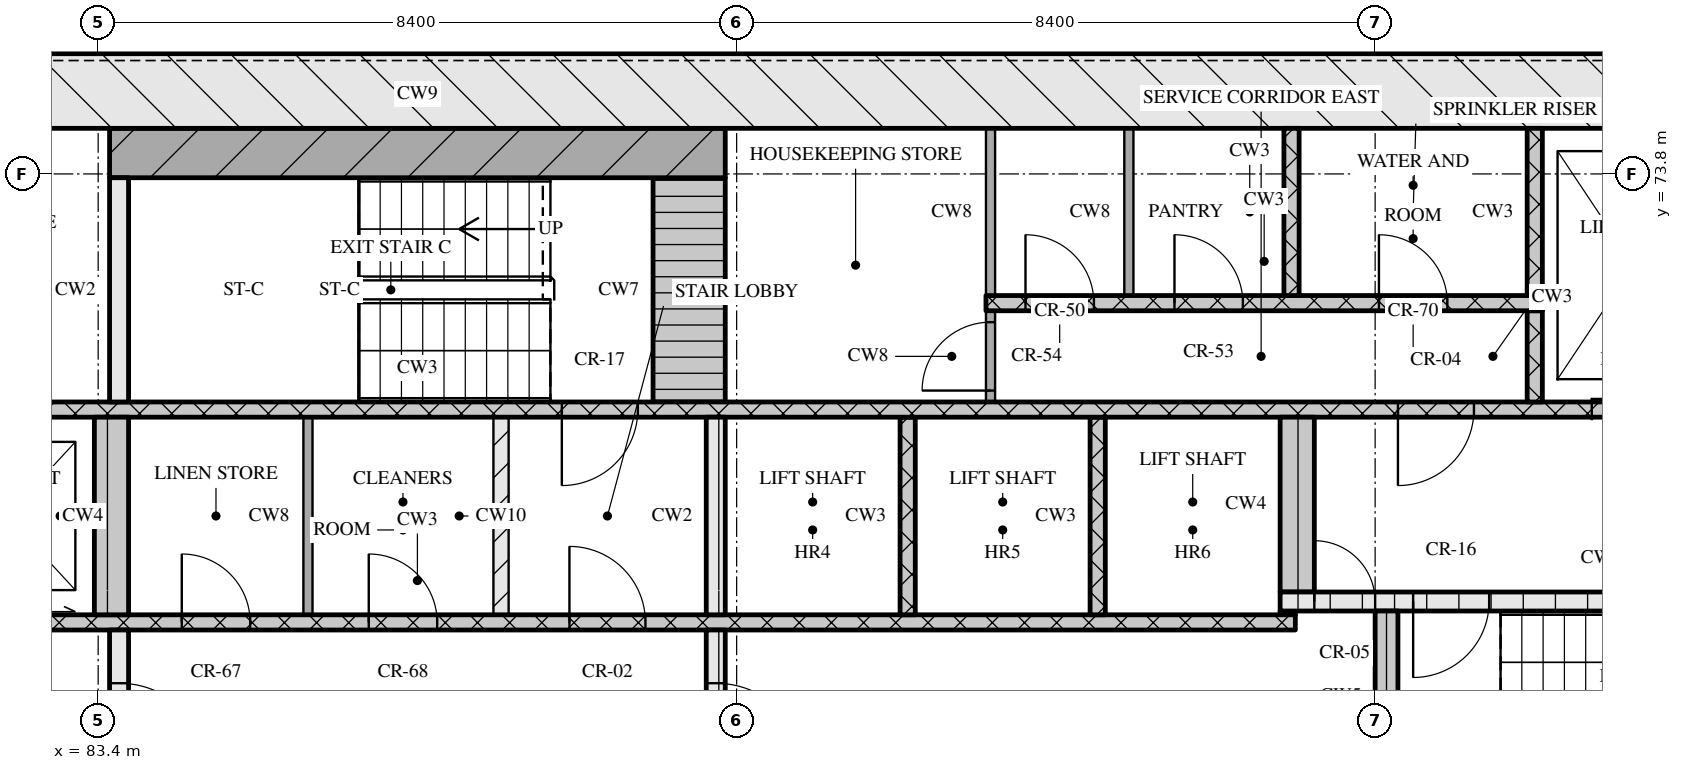
"""IFC4 building model, lengths in metres.
Left out: names, types, materials, properties, quantities, classifications, styles, units other than length and angle.
Written with IfcOpenShell. Run it as: python <this file> out.ifc"""

import sys

from ifc_helpers import new_model, si_unit, direction, frame, frame_2d, origin, place, context, subcontext, project, spatial, rectangle, extrude, element, fill, save


model = new_model("IFC4")
c1 = context("Model", 3, precision=1e-05, world=origin(), true_north=direction((0.0, 1.0)))
c2 = subcontext(c1, "Body", "Model", "MODEL_VIEW")
j1 = project(units=[si_unit("LENGTHUNIT", "METRE"), si_unit("PLANEANGLEUNIT", "RADIAN")], contexts=[c1])
p1 = place(None, origin())
s1 = spatial("IfcSite", under=j1, at=p1, CompositionType="ELEMENT")
p2 = place(p1, origin())
s2 = spatial("IfcBuilding", under=s1, at=p2, CompositionType="ELEMENT")
p3 = place(p2, frame((0.0, 0.0, 120.45)))
s3 = spatial("IfcBuildingStorey", under=s2, at=p3, CompositionType="ELEMENT", Elevation=120.45)
p4 = place(p3, frame((66.8, 74.9, 0.0), z_axis=(0.0, 0.0, 1.0), x_axis=(1.0, 0.0, 0.0)))
e1 = element("IfcWall", 1, at=p4, inside=s3, PredefinedType="SOLIDWALL", context=c2, shape_type="SweptSolid", body=[
    extrude(rectangle(XDim=41.6, YDim=1.0, at=frame_2d((20.8, 0.0))), origin(), (0.0, 0.0, 1.0), 3.32),
])
p5 = place(p3, frame((83.675, 65.2, 0.0), z_axis=(0.0, 0.0, 1.0), x_axis=(0.0, 1.0, 0.0)))
e2 = element("IfcWall", 2, at=p5, inside=s3, PredefinedType="SOLIDWALL", context=c2, shape_type="SweptSolid", body=[
    extrude(rectangle(XDim=2.6, YDim=0.25, at=frame_2d((1.3, 0.0))), origin(), (0.0, 0.0, 1.0), 3.32),
])
p6 = place(p5, frame((0.7, 0.0, 0.0)))
e3 = element("IfcOpeningElement", 3, at=p6, cuts=e2, PredefinedType="OPENING", context=c2, shape_type="SweptSolid", body=[
    extrude(rectangle(XDim=1.2, YDim=2.1, at=frame_2d((0.6, 1.05))), frame((0.0, 0.135, 0.0), z_axis=(0.0, -1.0, 0.0), x_axis=(1.0, 0.0, 0.0)), (0.0, 0.0, 1.0), 0.27),
])
p7 = place(p3, frame((91.525, 65.2, 0.0), z_axis=(0.0, 0.0, 1.0), x_axis=(0.0, 1.0, 0.0)))
e4 = element("IfcWall", 4, at=p7, inside=s3, PredefinedType="SOLIDWALL", context=c2, shape_type="SweptSolid", body=[
    extrude(rectangle(XDim=2.6, YDim=0.25, at=frame_2d((1.3, 0.0))), origin(), (0.0, 0.0, 1.0), 3.32),
])
p8 = place(p7, frame((0.7, 0.0, 0.0)))
e5 = element("IfcOpeningElement", 5, at=p8, cuts=e4, PredefinedType="OPENING", context=c2, shape_type="SweptSolid", body=[
    extrude(rectangle(XDim=1.2, YDim=2.1, at=frame_2d((0.6, 1.05))), frame((0.0, 0.135, 0.0), z_axis=(0.0, -1.0, 0.0), x_axis=(1.0, 0.0, 0.0)), (0.0, 0.0, 1.0), 0.27),
])
p9 = place(p3, frame((100.35, 65.2, 0.0), z_axis=(0.0, 0.0, 1.0), x_axis=(0.0, 1.0, 0.0)))
e6 = element("IfcWall", 6, at=p9, inside=s3, PredefinedType="SOLIDWALL", context=c2, shape_type="SweptSolid", body=[
    extrude(rectangle(XDim=2.85, YDim=0.3, at=frame_2d((1.425, 0.0))), origin(), (0.0, 0.0, 1.0), 3.32),
])
p10 = place(p3, frame((76.05, 67.9, 0.0), z_axis=(0.0, 0.0, 1.0), x_axis=(1.0, 0.0, 0.0)))
e7 = element("IfcWall", 7, at=p10, inside=s3, PredefinedType="SOLIDWALL", context=c2, shape_type="SweptSolid", body=[
    extrude(rectangle(XDim=23.1, YDim=0.2, at=frame_2d((11.55, 0.0))), origin(), (0.0, 0.0, 1.0), 3.32),
])
p11 = place(p10, frame((0.6, 0.0, 0.0)))
e8 = element("IfcOpeningElement", 8, at=p11, cuts=e7, PredefinedType="OPENING", context=c2, shape_type="SweptSolid", body=[
    extrude(rectangle(XDim=1.1, YDim=2.1, at=frame_2d((0.55, 1.05))), frame((0.0, 0.11, 0.0), z_axis=(0.0, -1.0, 0.0), x_axis=(1.0, 0.0, 0.0)), (0.0, 0.0, 1.0), 0.22),
])
p12 = place(p10, frame((3.1, 0.0, 0.0)))
e9 = element("IfcOpeningElement", 9, at=p12, cuts=e7, PredefinedType="OPENING", context=c2, shape_type="SweptSolid", body=[
    extrude(rectangle(XDim=1.1, YDim=2.1, at=frame_2d((0.55, 1.05))), frame((0.0, 0.11, 0.0), z_axis=(0.0, -1.0, 0.0), x_axis=(1.0, 0.0, 0.0)), (0.0, 0.0, 1.0), 0.22),
])
p13 = place(p10, frame((5.6, 0.0, 0.0)))
e10 = element("IfcOpeningElement", 10, at=p13, cuts=e7, PredefinedType="OPENING", context=c2, shape_type="SweptSolid", body=[
    extrude(rectangle(XDim=1.1, YDim=2.1, at=frame_2d((0.55, 1.05))), frame((0.0, 0.11, 0.0), z_axis=(0.0, -1.0, 0.0), x_axis=(1.0, 0.0, 0.0)), (0.0, 0.0, 1.0), 0.22),
])
p14 = place(p10, frame((8.45, 0.0, 0.0)))
e11 = element("IfcOpeningElement", 11, at=p14, cuts=e7, PredefinedType="OPENING", context=c2, shape_type="SweptSolid", body=[
    extrude(rectangle(XDim=0.9, YDim=2.1, at=frame_2d((0.45, 1.05))), frame((0.0, 0.11, 0.0), z_axis=(0.0, -1.0, 0.0), x_axis=(1.0, 0.0, 0.0)), (0.0, 0.0, 1.0), 0.22),
])
p15 = place(p10, frame((10.91, 0.0, 0.0)))
e12 = element("IfcOpeningElement", 12, at=p15, cuts=e7, PredefinedType="OPENING", context=c2, shape_type="SweptSolid", body=[
    extrude(rectangle(XDim=0.9, YDim=2.1, at=frame_2d((0.45, 1.05))), frame((0.0, 0.11, 0.0), z_axis=(0.0, -1.0, 0.0), x_axis=(1.0, 0.0, 0.0)), (0.0, 0.0, 1.0), 0.22),
])
p16 = place(p10, frame((13.55, 0.0, 0.0)))
e13 = element("IfcOpeningElement", 13, at=p16, cuts=e7, PredefinedType="OPENING", context=c2, shape_type="SweptSolid", body=[
    extrude(rectangle(XDim=1.0, YDim=2.1, at=frame_2d((0.5, 1.05))), frame((0.0, 0.11, 0.0), z_axis=(0.0, -1.0, 0.0), x_axis=(1.0, 0.0, 0.0)), (0.0, 0.0, 1.0), 0.22),
])
p17 = place(p3, frame((83.575, 68.0, 0.0), z_axis=(0.0, 0.0, 1.0), x_axis=(0.0, 1.0, 0.0)))
e14 = element("IfcWall", 14, at=p17, inside=s3, PredefinedType="SOLIDWALL", context=c2, shape_type="SweptSolid", body=[
    extrude(rectangle(XDim=2.6, YDim=0.45, at=frame_2d((1.3, 0.0))), origin(), (0.0, 0.0, 1.0), 3.32),
])
p18 = place(p3, frame((86.16, 68.0, 0.0), z_axis=(0.0, 0.0, 1.0), x_axis=(0.0, 1.0, 0.0)))
e15 = element("IfcWall", 15, at=p18, inside=s3, PredefinedType="PARTITIONING", context=c2, shape_type="SweptSolid", body=[
    extrude(rectangle(XDim=2.6, YDim=0.12, at=frame_2d((1.3, 0.0))), origin(), (0.0, 0.0, 1.0), 3.32),
])
p19 = place(p3, frame((88.7, 68.0, 0.0), z_axis=(0.0, 0.0, 1.0), x_axis=(0.0, 1.0, 0.0)))
e16 = element("IfcWall", 16, at=p19, inside=s3, PredefinedType="PARTITIONING", context=c2, shape_type="SweptSolid", body=[
    extrude(rectangle(XDim=2.6, YDim=0.2, at=frame_2d((1.3, 0.0))), origin(), (0.0, 0.0, 1.0), 3.32),
])
p20 = place(p3, frame((91.525, 68.0, 0.0), z_axis=(0.0, 0.0, 1.0), x_axis=(0.0, 1.0, 0.0)))
e17 = element("IfcWall", 17, at=p20, inside=s3, PredefinedType="SOLIDWALL", context=c2, shape_type="SweptSolid", body=[
    extrude(rectangle(XDim=2.6, YDim=0.25, at=frame_2d((1.3, 0.0))), origin(), (0.0, 0.0, 1.0), 3.32),
])
for number, where, z_axis, x_axis in (
    (18, (94.05, 68.0, 0.0), (0.0, 0.0, 1.0), (0.0, 1.0, 0.0)),
    (19, (96.55, 68.0, 0.0), (0.0, 0.0, 1.0), (0.0, 1.0, 0.0)),
):
    element("IfcWall", number, at=place(p3, frame(where, z_axis=z_axis, x_axis=x_axis)), inside=s3, PredefinedType="SOLIDWALL", context=c2, shape_type="SweptSolid", body=[
        extrude(rectangle(XDim=2.6, YDim=0.2, at=frame_2d((1.3, 0.0))), origin(), (0.0, 0.0, 1.0), 3.32),
    ])
p21 = place(p3, frame((98.95, 68.025, 0.0), z_axis=(0.0, 0.0, 1.0), x_axis=(1.0, 0.0, 0.0)))
e20 = element("IfcWall", 20, at=p21, inside=s3, PredefinedType="SOLIDWALL", context=c2, shape_type="SweptSolid", body=[
    extrude(rectangle(XDim=0.2, YDim=0.05, at=frame_2d((0.1, 0.0))), origin(), (0.0, 0.0, 1.0), 3.32),
])
p22 = place(p3, frame((98.95, 68.175, 0.0), z_axis=(0.0, 0.0, 1.0), x_axis=(1.0, 0.0, 0.0)))
e21 = element("IfcWall", 21, at=p22, inside=s3, PredefinedType="SOLIDWALL", context=c2, shape_type="SweptSolid", body=[
    extrude(rectangle(XDim=8.45, YDim=0.25, at=frame_2d((4.225, 0.0))), origin(), (0.0, 0.0, 1.0), 3.32),
])
p23 = place(p22, frame((0.45, 0.0, 0.0)))
e22 = element("IfcOpeningElement", 22, at=p23, cuts=e21, PredefinedType="OPENING", context=c2, shape_type="SweptSolid", body=[
    extrude(rectangle(XDim=0.8, YDim=2.1, at=frame_2d((0.4, 1.05))), frame((0.0, 0.135, 0.0), z_axis=(0.0, -1.0, 0.0), x_axis=(1.0, 0.0, 0.0)), (0.0, 0.0, 1.0), 0.27),
])
p24 = place(p22, frame((1.75, 0.0, 0.0)))
e23 = element("IfcOpeningElement", 23, at=p24, cuts=e21, PredefinedType="OPENING", context=c2, shape_type="SweptSolid", body=[
    extrude(rectangle(XDim=1.0, YDim=2.1, at=frame_2d((0.5, 1.05))), frame((0.0, 0.135, 0.0), z_axis=(0.0, -1.0, 0.0), x_axis=(1.0, 0.0, 0.0)), (0.0, 0.0, 1.0), 0.27),
])
p25 = place(p3, frame((99.175, 68.3, 0.0), z_axis=(0.0, 0.0, 1.0), x_axis=(0.0, 1.0, 0.0)))
e24 = element("IfcWall", 24, at=p25, inside=s3, PredefinedType="SOLIDWALL", context=c2, shape_type="SweptSolid", body=[
    extrude(rectangle(XDim=2.3, YDim=0.45, at=frame_2d((1.15, 0.0))), origin(), (0.0, 0.0, 1.0), 3.32),
])
p26 = place(p3, frame((67.8, 70.7, 0.0), z_axis=(0.0, 0.0, 1.0), x_axis=(1.0, 0.0, 0.0)))
e25 = element("IfcWall", 25, at=p26, inside=s3, PredefinedType="SOLIDWALL", context=c2, shape_type="SweptSolid", body=[
    extrude(rectangle(XDim=39.6, YDim=0.2, at=frame_2d((19.8, 0.0))), origin(), (0.0, 0.0, 1.0), 3.32),
])
p27 = place(p26, frame((0.65, 0.0, 0.0)))
e26 = element("IfcOpeningElement", 26, at=p27, cuts=e25, PredefinedType="OPENING", context=c2, shape_type="SweptSolid", body=[
    extrude(rectangle(XDim=1.1, YDim=2.1, at=frame_2d((0.55, 1.05))), frame((0.0, 0.11, 0.0), z_axis=(0.0, -1.0, 0.0), x_axis=(1.0, 0.0, 0.0)), (0.0, 0.0, 1.0), 0.22),
])
p28 = place(p26, frame((3.25, 0.0, 0.0)))
e27 = element("IfcOpeningElement", 27, at=p28, cuts=e25, PredefinedType="OPENING", context=c2, shape_type="SweptSolid", body=[
    extrude(rectangle(XDim=1.1, YDim=2.1, at=frame_2d((0.55, 1.05))), frame((0.0, 0.11, 0.0), z_axis=(0.0, -1.0, 0.0), x_axis=(1.0, 0.0, 0.0)), (0.0, 0.0, 1.0), 0.22),
])
p29 = place(p26, frame((5.9, 0.0, 0.0)))
e28 = element("IfcOpeningElement", 28, at=p29, cuts=e25, PredefinedType="OPENING", context=c2, shape_type="SweptSolid", body=[
    extrude(rectangle(XDim=1.0, YDim=2.1, at=frame_2d((0.5, 1.05))), frame((0.0, 0.11, 0.0), z_axis=(0.0, -1.0, 0.0), x_axis=(1.0, 0.0, 0.0)), (0.0, 0.0, 1.0), 0.22),
])
p30 = place(p26, frame((21.7, 0.0, 0.0)))
e29 = element("IfcOpeningElement", 29, at=p30, cuts=e25, PredefinedType="OPENING", context=c2, shape_type="SweptSolid", body=[
    extrude(rectangle(XDim=1.0, YDim=2.1, at=frame_2d((0.5, 1.05))), frame((0.0, 0.11, 0.0), z_axis=(0.0, -1.0, 0.0), x_axis=(1.0, 0.0, 0.0)), (0.0, 0.0, 1.0), 0.22),
])
p31 = place(p26, frame((32.7, 0.0, 0.0)))
e30 = element("IfcOpeningElement", 30, at=p31, cuts=e25, PredefinedType="OPENING", context=c2, shape_type="SweptSolid", body=[
    extrude(rectangle(XDim=1.0, YDim=2.1, at=frame_2d((0.5, 1.05))), frame((0.0, 0.11, 0.0), z_axis=(0.0, -1.0, 0.0), x_axis=(1.0, 0.0, 0.0)), (0.0, 0.0, 1.0), 0.22),
])
p32 = place(p26, frame((35.25, 0.0, 0.0)))
e31 = element("IfcOpeningElement", 31, at=p32, cuts=e25, PredefinedType="OPENING", context=c2, shape_type="SweptSolid", body=[
    extrude(rectangle(XDim=1.1, YDim=2.1, at=frame_2d((0.55, 1.05))), frame((0.0, 0.11, 0.0), z_axis=(0.0, -1.0, 0.0), x_axis=(1.0, 0.0, 0.0)), (0.0, 0.0, 1.0), 0.22),
])
p33 = place(p26, frame((37.85, 0.0, 0.0)))
e32 = element("IfcOpeningElement", 32, at=p33, cuts=e25, PredefinedType="OPENING", context=c2, shape_type="SweptSolid", body=[
    extrude(rectangle(XDim=1.1, YDim=2.1, at=frame_2d((0.55, 1.05))), frame((0.0, 0.11, 0.0), z_axis=(0.0, -1.0, 0.0), x_axis=(1.0, 0.0, 0.0)), (0.0, 0.0, 1.0), 0.22),
])
p34 = place(p3, frame((83.675, 70.8, 0.0), z_axis=(0.0, 0.0, 1.0), x_axis=(0.0, 1.0, 0.0)))
e33 = element("IfcWall", 33, at=p34, inside=s3, PredefinedType="SOLIDWALL", context=c2, shape_type="SweptSolid", body=[
    extrude(rectangle(XDim=2.95, YDim=0.25, at=frame_2d((1.475, 0.0))), origin(), (0.0, 0.0, 1.0), 3.32),
])
p35 = place(p3, frame((91.175, 70.8, 0.0), z_axis=(0.0, 0.0, 1.0), x_axis=(0.0, 1.0, 0.0)))
e34 = element("IfcWall", 34, at=p35, inside=s3, PredefinedType="SOLIDWALL", context=c2, shape_type="SweptSolid", body=[
    extrude(rectangle(XDim=2.95, YDim=0.95, at=frame_2d((1.475, 0.0))), origin(), (0.0, 0.0, 1.0), 3.32),
])
p36 = place(p3, frame((95.14, 70.8, 0.0), z_axis=(0.0, 0.0, 1.0), x_axis=(0.0, 1.0, 0.0)))
e35 = element("IfcWall", 35, at=p36, inside=s3, PredefinedType="PARTITIONING", context=c2, shape_type="SweptSolid", body=[
    extrude(rectangle(XDim=1.2, YDim=0.12, at=frame_2d((0.6, 0.0))), origin(), (0.0, 0.0, 1.0), 3.32),
])
p37 = place(p36, frame((0.15, 0.0, 0.0)))
e36 = element("IfcOpeningElement", 36, at=p37, cuts=e35, PredefinedType="OPENING", context=c2, shape_type="SweptSolid", body=[
    extrude(rectangle(XDim=0.9, YDim=2.1, at=frame_2d((0.45, 1.05))), frame((0.0, 0.07, 0.0), z_axis=(0.0, -1.0, 0.0), x_axis=(1.0, 0.0, 0.0)), (0.0, 0.0, 1.0), 0.14),
])
p38 = place(p3, frame((102.3, 70.8, 0.0), z_axis=(0.0, 0.0, 1.0), x_axis=(0.0, 1.0, 0.0)))
e37 = element("IfcWall", 37, at=p38, inside=s3, PredefinedType="SOLIDWALL", context=c2, shape_type="SweptSolid", body=[
    extrude(rectangle(XDim=1.2, YDim=0.2, at=frame_2d((0.6, 0.0))), origin(), (0.0, 0.0, 1.0), 3.32),
])
p39 = place(p3, frame((95.08, 72.1, 0.0), z_axis=(0.0, 0.0, 1.0), x_axis=(1.0, 0.0, 0.0)))
e38 = element("IfcWall", 38, at=p39, inside=s3, PredefinedType="SOLIDWALL", context=c2, shape_type="SweptSolid", body=[
    extrude(rectangle(XDim=7.32, YDim=0.2, at=frame_2d((3.66, 0.0))), origin(), (0.0, 0.0, 1.0), 3.32),
])
p40 = place(p39, frame((0.52, 0.0, 0.0)))
e39 = element("IfcOpeningElement", 39, at=p40, cuts=e38, PredefinedType="OPENING", context=c2, shape_type="SweptSolid", body=[
    extrude(rectangle(XDim=0.9, YDim=2.1, at=frame_2d((0.45, 1.05))), frame((0.0, 0.11, 0.0), z_axis=(0.0, -1.0, 0.0), x_axis=(1.0, 0.0, 0.0)), (0.0, 0.0, 1.0), 0.22),
])
p41 = place(p39, frame((2.48, 0.0, 0.0)))
e40 = element("IfcOpeningElement", 40, at=p41, cuts=e38, PredefinedType="OPENING", context=c2, shape_type="SweptSolid", body=[
    extrude(rectangle(XDim=0.9, YDim=2.1, at=frame_2d((0.45, 1.05))), frame((0.0, 0.11, 0.0), z_axis=(0.0, -1.0, 0.0), x_axis=(1.0, 0.0, 0.0)), (0.0, 0.0, 1.0), 0.22),
])
p42 = place(p39, frame((5.17, 0.0, 0.0)))
e41 = element("IfcOpeningElement", 41, at=p42, cuts=e38, PredefinedType="OPENING", context=c2, shape_type="SweptSolid", body=[
    extrude(rectangle(XDim=0.9, YDim=2.1, at=frame_2d((0.45, 1.05))), frame((0.0, 0.11, 0.0), z_axis=(0.0, -1.0, 0.0), x_axis=(1.0, 0.0, 0.0)), (0.0, 0.0, 1.0), 0.22),
])
for number, where, z_axis, x_axis in (
    (42, (95.14, 72.2, 0.0), (0.0, 0.0, 1.0), (0.0, 1.0, 0.0)),
    (43, (96.96, 72.2, 0.0), (0.0, 0.0, 1.0), (0.0, 1.0, 0.0)),
):
    element("IfcWall", number, at=place(p3, frame(where, z_axis=z_axis, x_axis=x_axis)), inside=s3, PredefinedType="PARTITIONING", context=c2, shape_type="SweptSolid", body=[
        extrude(rectangle(XDim=2.2, YDim=0.12, at=frame_2d((1.1, 0.0))), origin(), (0.0, 0.0, 1.0), 3.32),
    ])
for number, where, z_axis, x_axis in (
    (44, (99.1, 72.2, 0.0), (0.0, 0.0, 1.0), (0.0, 1.0, 0.0)),
    (45, (102.3, 72.2, 0.0), (0.0, 0.0, 1.0), (0.0, 1.0, 0.0)),
):
    element("IfcWall", number, at=place(p3, frame(where, z_axis=z_axis, x_axis=x_axis)), inside=s3, PredefinedType="SOLIDWALL", context=c2, shape_type="SweptSolid", body=[
        extrude(rectangle(XDim=2.2, YDim=0.2, at=frame_2d((1.1, 0.0))), origin(), (0.0, 0.0, 1.0), 3.32),
    ])
p43 = place(p3, frame((83.55, 74.075, 0.0), z_axis=(0.0, 0.0, 1.0), x_axis=(1.0, 0.0, 0.0)))
e46 = element("IfcWall", 46, at=p43, inside=s3, PredefinedType="SOLIDWALL", context=c2, shape_type="SweptSolid", body=[
    extrude(rectangle(XDim=8.1, YDim=0.65, at=frame_2d((4.05, 0.0))), origin(), (0.0, 0.0, 1.0), 3.32),
])
p44 = place(p6, origin())
e47 = element("IfcDoor", 47, at=p44, inside=s3, OperationType="SINGLE_SWING_RIGHT", PredefinedType="DOOR", context=c2, shape_type="SweptSolid", body=[
    extrude(rectangle(XDim=1.2, YDim=2.1, at=frame_2d((0.6, 1.05))), frame((0.0, 0.025, 0.0), z_axis=(0.0, -1.0, 0.0), x_axis=(1.0, 0.0, 0.0)), (0.0, 0.0, 1.0), 0.05),
])
fill(e3, e47)
p45 = place(p8, origin())
e48 = element("IfcDoor", 48, at=p45, inside=s3, OperationType="SINGLE_SWING_RIGHT", PredefinedType="DOOR", context=c2, shape_type="SweptSolid", body=[
    extrude(rectangle(XDim=1.2, YDim=2.1, at=frame_2d((0.6, 1.05))), frame((0.0, 0.025, 0.0), z_axis=(0.0, -1.0, 0.0), x_axis=(1.0, 0.0, 0.0)), (0.0, 0.0, 1.0), 0.05),
])
fill(e5, e48)
p46 = place(p14, origin())
e49 = element("IfcDoor", 49, at=p46, inside=s3, OperationType="SINGLE_SWING_LEFT", PredefinedType="DOOR", context=c2, shape_type="SweptSolid", body=[
    extrude(rectangle(XDim=0.9, YDim=2.1, at=frame_2d((0.45, 1.05))), frame((0.0, 0.025, 0.0), z_axis=(0.0, -1.0, 0.0), x_axis=(1.0, 0.0, 0.0)), (0.0, 0.0, 1.0), 0.05),
])
fill(e11, e49)
p47 = place(p15, origin())
e50 = element("IfcDoor", 50, at=p47, inside=s3, OperationType="SINGLE_SWING_LEFT", PredefinedType="DOOR", context=c2, shape_type="SweptSolid", body=[
    extrude(rectangle(XDim=0.9, YDim=2.1, at=frame_2d((0.45, 1.05))), frame((0.0, 0.025, 0.0), z_axis=(0.0, -1.0, 0.0), x_axis=(1.0, 0.0, 0.0)), (0.0, 0.0, 1.0), 0.05),
])
fill(e12, e50)
p48 = place(p16, origin())
e51 = element("IfcDoor", 51, at=p48, inside=s3, OperationType="SINGLE_SWING_LEFT", PredefinedType="DOOR", context=c2, shape_type="SweptSolid", body=[
    extrude(rectangle(XDim=1.0, YDim=2.1, at=frame_2d((0.5, 1.05))), frame((0.0, 0.025, 0.0), z_axis=(0.0, -1.0, 0.0), x_axis=(1.0, 0.0, 0.0)), (0.0, 0.0, 1.0), 0.05),
])
fill(e13, e51)
p49 = place(p23, origin())
e52 = element("IfcDoor", 52, at=p49, inside=s3, OperationType="SINGLE_SWING_LEFT", PredefinedType="DOOR", context=c2, shape_type="SweptSolid", body=[
    extrude(rectangle(XDim=0.8, YDim=2.1, at=frame_2d((0.4, 1.05))), frame((0.0, 0.025, 0.0), z_axis=(0.0, -1.0, 0.0), x_axis=(1.0, 0.0, 0.0)), (0.0, 0.0, 1.0), 0.05),
])
fill(e22, e52)
p50 = place(p24, origin())
e53 = element("IfcDoor", 53, at=p50, inside=s3, OperationType="SINGLE_SWING_RIGHT", PredefinedType="DOOR", context=c2, shape_type="SweptSolid", body=[
    extrude(rectangle(XDim=1.0, YDim=2.1, at=frame_2d((0.5, 1.05))), frame((0.0, 0.025, 0.0), z_axis=(0.0, -1.0, 0.0), x_axis=(1.0, 0.0, 0.0)), (0.0, 0.0, 1.0), 0.05),
])
fill(e23, e53)
p51 = place(p30, origin())
e54 = element("IfcDoor", 54, at=p51, inside=s3, OperationType="SINGLE_SWING_RIGHT", PredefinedType="DOOR", context=c2, shape_type="SweptSolid", body=[
    extrude(rectangle(XDim=1.0, YDim=2.1, at=frame_2d((0.5, 1.05))), frame((0.0, 0.025, 0.0), z_axis=(0.0, -1.0, 0.0), x_axis=(1.0, 0.0, 0.0)), (0.0, 0.0, 1.0), 0.05),
])
fill(e29, e54)
p52 = place(p31, origin())
e55 = element("IfcDoor", 55, at=p52, inside=s3, OperationType="SINGLE_SWING_RIGHT", PredefinedType="DOOR", context=c2, shape_type="SweptSolid", body=[
    extrude(rectangle(XDim=1.0, YDim=2.1, at=frame_2d((0.5, 1.05))), frame((0.0, 0.025, 0.0), z_axis=(0.0, -1.0, 0.0), x_axis=(1.0, 0.0, 0.0)), (0.0, 0.0, 1.0), 0.05),
])
fill(e30, e55)
p53 = place(p32, origin())
e56 = element("IfcDoor", 56, at=p53, inside=s3, OperationType="SLIDING_TO_RIGHT", PredefinedType="DOOR", context=c2, shape_type="SweptSolid", body=[
    extrude(rectangle(XDim=1.1, YDim=2.1, at=frame_2d((0.55, 1.05))), frame((0.0, 0.025, 0.0), z_axis=(0.0, -1.0, 0.0), x_axis=(1.0, 0.0, 0.0)), (0.0, 0.0, 1.0), 0.05),
])
fill(e31, e56)
p54 = place(p37, origin())
e57 = element("IfcDoor", 57, at=p54, inside=s3, OperationType="SINGLE_SWING_LEFT", PredefinedType="DOOR", context=c2, shape_type="SweptSolid", body=[
    extrude(rectangle(XDim=0.9, YDim=2.1, at=frame_2d((0.45, 1.05))), frame((0.0, 0.025, 0.0), z_axis=(0.0, -1.0, 0.0), x_axis=(1.0, 0.0, 0.0)), (0.0, 0.0, 1.0), 0.05),
])
fill(e36, e57)
p55 = place(p40, origin())
e58 = element("IfcDoor", 58, at=p55, inside=s3, OperationType="SINGLE_SWING_LEFT", PredefinedType="DOOR", context=c2, shape_type="SweptSolid", body=[
    extrude(rectangle(XDim=0.9, YDim=2.1, at=frame_2d((0.45, 1.05))), frame((0.0, 0.025, 0.0), z_axis=(0.0, -1.0, 0.0), x_axis=(1.0, 0.0, 0.0)), (0.0, 0.0, 1.0), 0.05),
])
fill(e39, e58)
p56 = place(p41, origin())
e59 = element("IfcDoor", 59, at=p56, inside=s3, OperationType="SINGLE_SWING_LEFT", PredefinedType="DOOR", context=c2, shape_type="SweptSolid", body=[
    extrude(rectangle(XDim=0.9, YDim=2.1, at=frame_2d((0.45, 1.05))), frame((0.0, 0.025, 0.0), z_axis=(0.0, -1.0, 0.0), x_axis=(1.0, 0.0, 0.0)), (0.0, 0.0, 1.0), 0.05),
])
fill(e40, e59)
p57 = place(p42, origin())
e60 = element("IfcDoor", 60, at=p57, inside=s3, OperationType="SINGLE_SWING_LEFT", PredefinedType="DOOR", context=c2, shape_type="SweptSolid", body=[
    extrude(rectangle(XDim=0.9, YDim=2.1, at=frame_2d((0.45, 1.05))), frame((0.0, 0.025, 0.0), z_axis=(0.0, -1.0, 0.0), x_axis=(1.0, 0.0, 0.0)), (0.0, 0.0, 1.0), 0.05),
])
fill(e41, e60)
save(model, sys.argv[1])
